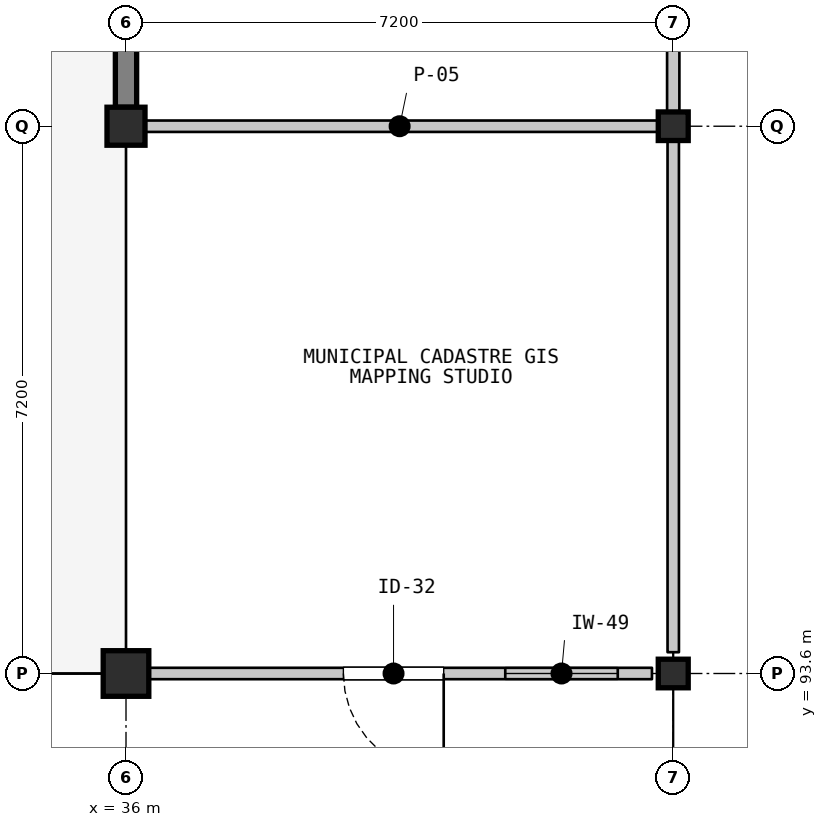
"""IFC4 building model, lengths in metres.
Left out: names, types, materials, properties, quantities, classifications, styles, units other than length and angle.
Written with IfcOpenShell. Run it as: python <this file> out.ifc"""

import sys

from ifc_helpers import new_model, si_unit, direction, frame, frame_2d, origin, origin_2d, place, context, subcontext, project, spatial, rectangle, i_section, extrude, element, fill, save


model = new_model("IFC4")
c1 = context("Model", 3, precision=1e-05, world=origin(), true_north=direction((0.0, 1.0)))
c2 = subcontext(c1, "Body", "Model", "MODEL_VIEW")
j1 = project(units=[si_unit("LENGTHUNIT", "METRE"), si_unit("PLANEANGLEUNIT", "RADIAN")], contexts=[c1])
p1 = place(None, origin())
s1 = spatial("IfcSite", under=j1, at=p1, CompositionType="ELEMENT")
p2 = place(p1, origin())
s2 = spatial("IfcBuilding", under=s1, at=p2, CompositionType="ELEMENT")
p3 = place(p2, frame((0.0, 0.0, 5.4)))
s3 = spatial("IfcBuildingStorey", under=s2, at=p3, CompositionType="ELEMENT", Elevation=5.4)
p4 = place(p3, frame((36.0, 93.6, 0.0), z_axis=(0.0, 0.0, 1.0), x_axis=(1.0, 0.0, 0.0)))
e1 = element("IfcColumn", 1, at=p4, inside=s3, PredefinedType="COLUMN", context=c2, shape_type="SweptSolid", body=[
    extrude(rectangle(XDim=0.6, YDim=0.6, at=origin_2d()), origin(), (0.0, 0.0, 1.0), 4.5),
])
p5 = place(p3, frame((36.0, 100.8, 0.0), z_axis=(0.0, 0.0, 1.0), x_axis=(1.0, 0.0, 0.0)))
e2 = element("IfcColumn", 2, at=p5, inside=s3, PredefinedType="COLUMN", context=c2, shape_type="SweptSolid", body=[
    extrude(rectangle(XDim=0.5, YDim=0.5, at=origin_2d()), origin(), (0.0, 0.0, 1.0), 4.5),
])
for number, where, z_axis, x_axis in (
    (3, (43.2, 93.6, 0.0), (0.0, 0.0, 1.0), (1.0, 0.0, 0.0)),
    (4, (43.2, 100.8, 0.0), (0.0, 0.0, 1.0), (1.0, 0.0, 0.0)),
):
    element("IfcColumn", number, at=place(p3, frame(where, z_axis=z_axis, x_axis=x_axis)), inside=s3, PredefinedType="COLUMN", context=c2, shape_type="SweptSolid", body=[
        extrude(i_section(OverallWidth=0.394, OverallDepth=0.376, WebThickness=0.017, FlangeThickness=0.028, FilletRadius=0.015, at=origin_2d()), origin(), (0.0, 0.0, 1.0), 4.5),
    ])
p6 = place(p3, frame((36.0, 101.05, 0.0), z_axis=(0.0, 0.0, 1.0), x_axis=(0.0, 1.0, 0.0)))
e5 = element("IfcWall", 5, at=p6, inside=s3, PredefinedType="SOLIDWALL", context=c2, shape_type="SweptSolid", body=[
    extrude(rectangle(XDim=6.7, YDim=0.28, at=frame_2d((3.35, 0.0))), origin(), (0.0, 0.0, 1.0), 3.767),
])
p7 = place(p6, frame((2.05, 0.0, 0.95)))
e6 = element("IfcOpeningElement", 6, at=p7, cuts=e5, PredefinedType="OPENING", context=c2, shape_type="SweptSolid", body=[
    extrude(rectangle(XDim=2.6, YDim=1.9, at=frame_2d((1.3, 0.95))), frame((0.0, 0.15, 0.0), z_axis=(0.0, -1.0, 0.0), x_axis=(1.0, 0.0, 0.0)), (0.0, 0.0, 1.0), 0.3),
])
p8 = place(p3, frame((42.92, 93.6, 0.0), z_axis=(0.0, 0.0, 1.0), x_axis=(-1.0, 0.0, 0.0)))
e7 = element("IfcWall", 7, at=p8, inside=s3, PredefinedType="PARTITIONING", context=c2, shape_type="SweptSolid", body=[
    extrude(rectangle(XDim=6.8, YDim=0.15, at=frame_2d((3.4, 0.0))), origin(), (0.0, 0.0, 1.0), 3.688),
])
p9 = place(p8, frame((2.74, 0.0, 0.0)))
e8 = element("IfcOpeningElement", 8, at=p9, cuts=e7, PredefinedType="OPENING", context=c2, shape_type="SweptSolid", body=[
    extrude(rectangle(XDim=1.32, YDim=2.24, at=frame_2d((0.66, 1.12))), frame((0.0, 0.085, 0.0), z_axis=(0.0, -1.0, 0.0), x_axis=(1.0, 0.0, 0.0)), (0.0, 0.0, 1.0), 0.17),
])
p10 = place(p8, frame((0.45, 0.0, 1.05)))
e9 = element("IfcOpeningElement", 9, at=p10, cuts=e7, PredefinedType="OPENING", context=c2, shape_type="SweptSolid", body=[
    extrude(rectangle(XDim=1.48, YDim=1.48, at=frame_2d((0.74, 0.74))), frame((0.0, 0.085, 0.0), z_axis=(0.0, -1.0, 0.0), x_axis=(1.0, 0.0, 0.0)), (0.0, 0.0, 1.0), 0.17),
])
p11 = place(p3, frame((36.12, 100.8, 0.0), z_axis=(0.0, 0.0, 1.0), x_axis=(1.0, 0.0, 0.0)))
e10 = element("IfcWall", 10, at=p11, inside=s3, PredefinedType="PARTITIONING", context=c2, shape_type="SweptSolid", body=[
    extrude(rectangle(XDim=6.96, YDim=0.15, at=frame_2d((3.48, 0.0))), origin(), (0.0, 0.0, 1.0), 3.688),
])
p12 = place(p3, frame((43.2, 100.68, 0.0), z_axis=(0.0, 0.0, 1.0), x_axis=(0.0, -1.0, 0.0)))
e11 = element("IfcWall", 11, at=p12, inside=s3, PredefinedType="PARTITIONING", context=c2, shape_type="SweptSolid", body=[
    extrude(rectangle(XDim=6.8, YDim=0.15, at=frame_2d((3.4, 0.0))), origin(), (0.0, 0.0, 1.0), 3.688),
])
p13 = place(p3, frame((43.2, 107.88, 0.0), z_axis=(0.0, 0.0, 1.0), x_axis=(0.0, -1.0, 0.0)))
e12 = element("IfcWall", 12, at=p13, inside=s3, PredefinedType="PARTITIONING", context=c2, shape_type="SweptSolid", body=[
    extrude(rectangle(XDim=6.96, YDim=0.162, at=frame_2d((3.48, 0.0))), origin(), (0.0, 0.0, 1.0), 3.688),
])
p14 = place(p13, frame((2.8, 0.0, 0.0)))
e13 = element("IfcOpeningElement", 13, at=p14, cuts=e12, PredefinedType="OPENING", context=c2, shape_type="SweptSolid", body=[
    extrude(rectangle(XDim=1.36, YDim=2.24, at=frame_2d((0.68, 1.12))), frame((0.0, 0.091, 0.0), z_axis=(0.0, -1.0, 0.0), x_axis=(1.0, 0.0, 0.0)), (0.0, 0.0, 1.0), 0.182),
])
p15 = place(p13, frame((0.45, 0.0, 1.05)))
e14 = element("IfcOpeningElement", 14, at=p15, cuts=e12, PredefinedType="OPENING", context=c2, shape_type="SweptSolid", body=[
    extrude(rectangle(XDim=1.58, YDim=1.48, at=frame_2d((0.79, 0.74))), frame((0.0, 0.091, 0.0), z_axis=(0.0, -1.0, 0.0), x_axis=(1.0, 0.0, 0.0)), (0.0, 0.0, 1.0), 0.182),
])
p16 = place(p9, origin())
e15 = element("IfcDoor", 15, at=p16, inside=s3, OperationType="SINGLE_SWING_LEFT", PredefinedType="DOOR", context=c2, shape_type="SweptSolid", body=[
    extrude(rectangle(XDim=1.32, YDim=2.24, at=frame_2d((0.66, 1.12))), frame((0.0, 0.025, 0.0), z_axis=(0.0, -1.0, 0.0), x_axis=(1.0, 0.0, 0.0)), (0.0, 0.0, 1.0), 0.05),
])
fill(e8, e15)
p17 = place(p10, origin())
e16 = element("IfcWindow", 16, at=p17, inside=s3, PartitioningType="SINGLE_PANEL", PredefinedType="WINDOW", context=c2, shape_type="SweptSolid", body=[
    extrude(rectangle(XDim=1.48, YDim=1.48, at=frame_2d((0.74, 0.74))), frame((0.0, 0.03, 0.0), z_axis=(0.0, -1.0, 0.0), x_axis=(1.0, 0.0, 0.0)), (0.0, 0.0, 1.0), 0.06),
])
fill(e9, e16)
save(model, sys.argv[1])
